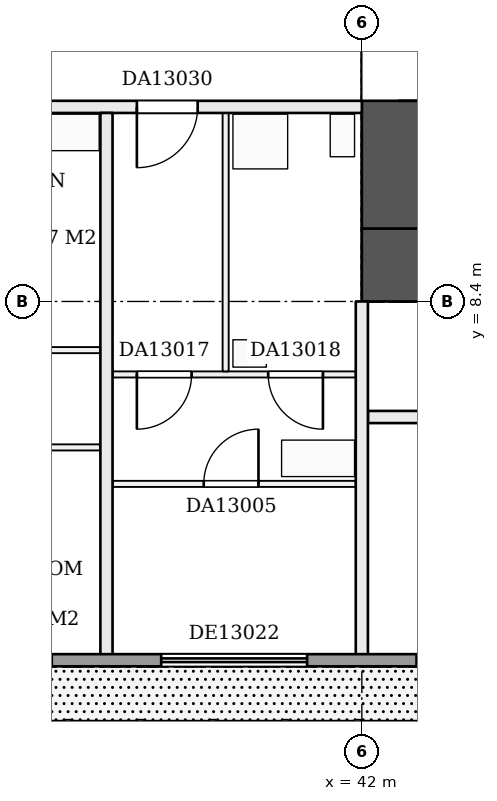
"""IFC4 building model, lengths in metres.
Left out: names, types, materials, properties, quantities, classifications, styles, units other than length and angle.
Written with IfcOpenShell. Run it as: python <this file> out.ifc"""

import sys

from ifc_helpers import new_model, si_unit, direction, frame, frame_2d, origin, place, context, subcontext, project, spatial, rectangle, extrude, element, fill, save


model = new_model("IFC4")
c1 = context("Model", 3, precision=1e-05, world=origin(), true_north=direction((0.0, 1.0)))
c2 = subcontext(c1, "Body", "Model", "MODEL_VIEW")
j1 = project(units=[si_unit("LENGTHUNIT", "METRE"), si_unit("PLANEANGLEUNIT", "RADIAN")], contexts=[c1])
p1 = place(None, origin())
s1 = spatial("IfcSite", under=j1, at=p1, CompositionType="ELEMENT")
p2 = place(p1, origin())
s2 = spatial("IfcBuilding", under=s1, at=p2, CompositionType="ELEMENT")
p3 = place(p2, frame((0.0, 0.0, 56.7)))
s3 = spatial("IfcBuildingStorey", under=s2, at=p3, CompositionType="ELEMENT", Elevation=56.7)
p4 = place(p3, frame((42.0, 9.0, 0.0), z_axis=(0.0, 0.0, 1.0), x_axis=(1.0, 0.0, 0.0)))
e1 = element("IfcWall", 1, at=p4, inside=s3, PredefinedType="SHEAR", context=c2, shape_type="SweptSolid", body=[
    extrude(rectangle(XDim=16.8, YDim=1.2, at=frame_2d((8.4, 0.0))), origin(), (0.0, 0.0, 1.0), 3.22),
])
p5 = place(p4, frame((3.1, 0.0, 0.0)))
e2 = element("IfcOpeningElement", 2, at=p5, cuts=e1, PredefinedType="OPENING", context=c2, shape_type="SweptSolid", body=[
    extrude(rectangle(XDim=1.0, YDim=2.1, at=frame_2d((0.5, 1.05))), frame((0.0, 0.61, 0.0), z_axis=(0.0, -1.0, 0.0), x_axis=(1.0, 0.0, 0.0)), (0.0, 0.0, 1.0), 1.22),
])
p6 = place(p4, frame((12.7, 0.0, 0.0)))
e3 = element("IfcOpeningElement", 3, at=p6, cuts=e1, PredefinedType="OPENING", context=c2, shape_type="SweptSolid", body=[
    extrude(rectangle(XDim=1.0, YDim=2.1, at=frame_2d((0.5, 1.05))), frame((0.0, 0.61, 0.0), z_axis=(0.0, -1.0, 0.0), x_axis=(1.0, 0.0, 0.0)), (0.0, 0.0, 1.0), 1.22),
])
p7 = place(p3, frame((42.6, 9.6, 0.0), z_axis=(0.0, 0.0, 1.0), x_axis=(0.0, 1.0, 0.0)))
e4 = element("IfcWall", 4, at=p7, inside=s3, PredefinedType="SHEAR", context=c2, shape_type="SweptSolid", body=[
    extrude(rectangle(XDim=14.4, YDim=1.2, at=frame_2d((7.2, 0.0))), origin(), (0.0, 0.0, 1.0), 3.22),
])
p8 = place(p7, frame((2.1, 0.0, 0.0)))
e5 = element("IfcOpeningElement", 5, at=p8, cuts=e4, PredefinedType="OPENING", context=c2, shape_type="SweptSolid", body=[
    extrude(rectangle(XDim=1.8, YDim=2.1, at=frame_2d((0.9, 1.05))), frame((0.0, 0.61, 0.0), z_axis=(0.0, -1.0, 0.0), x_axis=(1.0, 0.0, 0.0)), (0.0, 0.0, 1.0), 1.22),
])
p9 = place(p3, frame((37.9, 5.4, 0.0), z_axis=(0.0, 0.0, 1.0), x_axis=(1.0, 0.0, 0.0)))
e6 = element("IfcWall", 6, at=p9, inside=s3, PredefinedType="PARTITIONING", context=c2, shape_type="SweptSolid", body=[
    extrude(rectangle(XDim=4.0, YDim=0.1, at=frame_2d((2.0, 0.0))), origin(), (0.0, 0.0, 1.0), 3.22),
])
p10 = place(p9, frame((1.5, 0.0, 0.0)))
e7 = element("IfcOpeningElement", 7, at=p10, cuts=e6, PredefinedType="OPENING", context=c2, shape_type="SweptSolid", body=[
    extrude(rectangle(XDim=0.9, YDim=2.1, at=frame_2d((0.45, 1.05))), frame((0.0, 0.06, 0.0), z_axis=(0.0, -1.0, 0.0), x_axis=(1.0, 0.0, 0.0)), (0.0, 0.0, 1.0), 0.12),
])
p11 = place(p3, frame((8.45, 6.0, 0.0), z_axis=(0.0, 0.0, 1.0), x_axis=(1.0, 0.0, 0.0)))
e8 = element("IfcWall", 8, at=p11, inside=s3, PredefinedType="PARTITIONING", context=c2, shape_type="SweptSolid", body=[
    extrude(rectangle(XDim=29.25, YDim=0.1, at=frame_2d((14.625, 0.0))), origin(), (0.0, 0.0, 1.0), 3.22),
])
p12 = place(p11, frame((3.75, 0.0, 0.0)))
e9 = element("IfcOpeningElement", 9, at=p12, cuts=e8, PredefinedType="OPENING", context=c2, shape_type="SweptSolid", body=[
    extrude(rectangle(XDim=0.9, YDim=2.1, at=frame_2d((0.45, 1.05))), frame((0.0, 0.06, 0.0), z_axis=(0.0, -1.0, 0.0), x_axis=(1.0, 0.0, 0.0)), (0.0, 0.0, 1.0), 0.12),
])
p13 = place(p11, frame((9.95, 0.0, 0.0)))
e10 = element("IfcOpeningElement", 10, at=p13, cuts=e8, PredefinedType="OPENING", context=c2, shape_type="SweptSolid", body=[
    extrude(rectangle(XDim=0.9, YDim=2.1, at=frame_2d((0.45, 1.05))), frame((0.0, 0.06, 0.0), z_axis=(0.0, -1.0, 0.0), x_axis=(1.0, 0.0, 0.0)), (0.0, 0.0, 1.0), 0.12),
])
p14 = place(p11, frame((14.25, 0.0, 0.0)))
e11 = element("IfcOpeningElement", 11, at=p14, cuts=e8, PredefinedType="OPENING", context=c2, shape_type="SweptSolid", body=[
    extrude(rectangle(XDim=0.9, YDim=2.1, at=frame_2d((0.45, 1.05))), frame((0.0, 0.06, 0.0), z_axis=(0.0, -1.0, 0.0), x_axis=(1.0, 0.0, 0.0)), (0.0, 0.0, 1.0), 0.12),
])
p15 = place(p11, frame((20.45, 0.0, 0.0)))
e12 = element("IfcOpeningElement", 12, at=p15, cuts=e8, PredefinedType="OPENING", context=c2, shape_type="SweptSolid", body=[
    extrude(rectangle(XDim=0.9, YDim=2.1, at=frame_2d((0.45, 1.05))), frame((0.0, 0.06, 0.0), z_axis=(0.0, -1.0, 0.0), x_axis=(1.0, 0.0, 0.0)), (0.0, 0.0, 1.0), 0.12),
])
p16 = place(p11, frame((26.75, 0.0, 0.0)))
e13 = element("IfcOpeningElement", 13, at=p16, cuts=e8, PredefinedType="OPENING", context=c2, shape_type="SweptSolid", body=[
    extrude(rectangle(XDim=0.9, YDim=2.1, at=frame_2d((0.45, 1.05))), frame((0.0, 0.06, 0.0), z_axis=(0.0, -1.0, 0.0), x_axis=(1.0, 0.0, 0.0)), (0.0, 0.0, 1.0), 0.12),
])
p17 = place(p3, frame((42.1, 6.5, 0.0), z_axis=(0.0, 0.0, 1.0), x_axis=(1.0, 0.0, 0.0)))
e14 = element("IfcWall", 14, at=p17, inside=s3, PredefinedType="PARTITIONING", context=c2, shape_type="SweptSolid", body=[
    extrude(rectangle(XDim=18.7, YDim=0.2, at=frame_2d((9.35, 0.0))), origin(), (0.0, 0.0, 1.0), 3.22),
])
p18 = place(p17, frame((4.6, 0.0, 0.0)))
e15 = element("IfcOpeningElement", 15, at=p18, cuts=e14, PredefinedType="OPENING", context=c2, shape_type="SweptSolid", body=[
    extrude(rectangle(XDim=1.0, YDim=2.1, at=frame_2d((0.5, 1.05))), frame((0.0, 0.11, 0.0), z_axis=(0.0, -1.0, 0.0), x_axis=(1.0, 0.0, 0.0)), (0.0, 0.0, 1.0), 0.22),
])
p19 = place(p17, frame((13.1, 0.0, 0.0)))
e16 = element("IfcOpeningElement", 16, at=p19, cuts=e14, PredefinedType="OPENING", context=c2, shape_type="SweptSolid", body=[
    extrude(rectangle(XDim=1.0, YDim=2.1, at=frame_2d((0.5, 1.05))), frame((0.0, 0.11, 0.0), z_axis=(0.0, -1.0, 0.0), x_axis=(1.0, 0.0, 0.0)), (0.0, 0.0, 1.0), 0.22),
])
p20 = place(p17, frame((17.1, 0.0, 0.0)))
e17 = element("IfcOpeningElement", 17, at=p20, cuts=e14, PredefinedType="OPENING", context=c2, shape_type="SweptSolid", body=[
    extrude(rectangle(XDim=1.0, YDim=2.1, at=frame_2d((0.5, 1.05))), frame((0.0, 0.11, 0.0), z_axis=(0.0, -1.0, 0.0), x_axis=(1.0, 0.0, 0.0)), (0.0, 0.0, 1.0), 0.22),
])
p21 = place(p3, frame((37.9, 7.2, 0.0), z_axis=(0.0, 0.0, 1.0), x_axis=(1.0, 0.0, 0.0)))
e18 = element("IfcWall", 18, at=p21, inside=s3, PredefinedType="PARTITIONING", context=c2, shape_type="SweptSolid", body=[
    extrude(rectangle(XDim=4.0, YDim=0.1, at=frame_2d((2.0, 0.0))), origin(), (0.0, 0.0, 1.0), 3.22),
])
p22 = place(p21, frame((0.4, 0.0, 0.0)))
e19 = element("IfcOpeningElement", 19, at=p22, cuts=e18, PredefinedType="OPENING", context=c2, shape_type="SweptSolid", body=[
    extrude(rectangle(XDim=0.9, YDim=2.1, at=frame_2d((0.45, 1.05))), frame((0.0, 0.06, 0.0), z_axis=(0.0, -1.0, 0.0), x_axis=(1.0, 0.0, 0.0)), (0.0, 0.0, 1.0), 0.12),
])
p23 = place(p21, frame((2.56, 0.0, 0.0)))
e20 = element("IfcOpeningElement", 20, at=p23, cuts=e18, PredefinedType="OPENING", context=c2, shape_type="SweptSolid", body=[
    extrude(rectangle(XDim=0.9, YDim=2.1, at=frame_2d((0.45, 1.05))), frame((0.0, 0.06, 0.0), z_axis=(0.0, -1.0, 0.0), x_axis=(1.0, 0.0, 0.0)), (0.0, 0.0, 1.0), 0.12),
])
p24 = place(p3, frame((25.3, 7.6, 0.0), z_axis=(0.0, 0.0, 1.0), x_axis=(1.0, 0.0, 0.0)))
e21 = element("IfcWall", 21, at=p24, inside=s3, PredefinedType="PARTITIONING", context=c2, shape_type="SweptSolid", body=[
    extrude(rectangle(XDim=12.4, YDim=0.1, at=frame_2d((6.2, 0.0))), origin(), (0.0, 0.0, 1.0), 3.22),
])
p25 = place(p24, frame((3.6, 0.0, 0.0)))
e22 = element("IfcOpeningElement", 22, at=p25, cuts=e21, PredefinedType="OPENING", context=c2, shape_type="SweptSolid", body=[
    extrude(rectangle(XDim=0.9, YDim=2.1, at=frame_2d((0.45, 1.05))), frame((0.0, 0.06, 0.0), z_axis=(0.0, -1.0, 0.0), x_axis=(1.0, 0.0, 0.0)), (0.0, 0.0, 1.0), 0.12),
])
p26 = place(p24, frame((0.8, 0.0, 0.0)))
e23 = element("IfcOpeningElement", 23, at=p26, cuts=e21, PredefinedType="OPENING", context=c2, shape_type="SweptSolid", body=[
    extrude(rectangle(XDim=0.9, YDim=2.1, at=frame_2d((0.45, 1.05))), frame((0.0, 0.06, 0.0), z_axis=(0.0, -1.0, 0.0), x_axis=(1.0, 0.0, 0.0)), (0.0, 0.0, 1.0), 0.12),
])
p27 = place(p24, frame((6.5, 0.0, 0.0)))
e24 = element("IfcOpeningElement", 24, at=p27, cuts=e21, PredefinedType="OPENING", context=c2, shape_type="SweptSolid", body=[
    extrude(rectangle(XDim=0.9, YDim=2.1, at=frame_2d((0.45, 1.05))), frame((0.0, 0.06, 0.0), z_axis=(0.0, -1.0, 0.0), x_axis=(1.0, 0.0, 0.0)), (0.0, 0.0, 1.0), 0.12),
])
p28 = place(p24, frame((10.1, 0.0, 0.0)))
e25 = element("IfcOpeningElement", 25, at=p28, cuts=e21, PredefinedType="OPENING", context=c2, shape_type="SweptSolid", body=[
    extrude(rectangle(XDim=0.9, YDim=2.1, at=frame_2d((0.45, 1.05))), frame((0.0, 0.06, 0.0), z_axis=(0.0, -1.0, 0.0), x_axis=(1.0, 0.0, 0.0)), (0.0, 0.0, 1.0), 0.12),
])
p29 = place(p3, frame((11.5, 11.6, 0.0), z_axis=(0.0, 0.0, 1.0), x_axis=(1.0, 0.0, 0.0)))
e26 = element("IfcWall", 26, at=p29, inside=s3, PredefinedType="PARTITIONING", context=c2, shape_type="SweptSolid", body=[
    extrude(rectangle(XDim=30.5, YDim=0.2, at=frame_2d((15.25, 0.0))), origin(), (0.0, 0.0, 1.0), 3.22),
])
p30 = place(p29, frame((1.626, 0.0, 0.0)))
e27 = element("IfcOpeningElement", 27, at=p30, cuts=e26, PredefinedType="OPENING", context=c2, shape_type="SweptSolid", body=[
    extrude(rectangle(XDim=1.0, YDim=2.1, at=frame_2d((0.5, 1.05))), frame((0.0, 0.11, 0.0), z_axis=(0.0, -1.0, 0.0), x_axis=(1.0, 0.0, 0.0)), (0.0, 0.0, 1.0), 0.22),
])
p31 = place(p29, frame((11.933, 0.0, 0.0)))
e28 = element("IfcOpeningElement", 28, at=p31, cuts=e26, PredefinedType="OPENING", context=c2, shape_type="SweptSolid", body=[
    extrude(rectangle(XDim=1.0, YDim=2.1, at=frame_2d((0.5, 1.05))), frame((0.0, 0.11, 0.0), z_axis=(0.0, -1.0, 0.0), x_axis=(1.0, 0.0, 0.0)), (0.0, 0.0, 1.0), 0.22),
])
p32 = place(p29, frame((17.3, 0.0, 0.0)))
e29 = element("IfcOpeningElement", 29, at=p32, cuts=e26, PredefinedType="OPENING", context=c2, shape_type="SweptSolid", body=[
    extrude(rectangle(XDim=1.0, YDim=2.1, at=frame_2d((0.5, 1.05))), frame((0.0, 0.11, 0.0), z_axis=(0.0, -1.0, 0.0), x_axis=(1.0, 0.0, 0.0)), (0.0, 0.0, 1.0), 0.22),
])
p33 = place(p29, frame((26.8, 0.0, 0.0)))
e30 = element("IfcOpeningElement", 30, at=p33, cuts=e26, PredefinedType="OPENING", context=c2, shape_type="SweptSolid", body=[
    extrude(rectangle(XDim=1.0, YDim=2.1, at=frame_2d((0.5, 1.05))), frame((0.0, 0.11, 0.0), z_axis=(0.0, -1.0, 0.0), x_axis=(1.0, 0.0, 0.0)), (0.0, 0.0, 1.0), 0.22),
])
p34 = place(p3, frame((37.8, 2.5, 0.0), z_axis=(0.0, 0.0, 1.0), x_axis=(0.0, 1.0, 0.0)))
e31 = element("IfcWall", 31, at=p34, inside=s3, PredefinedType="PARTITIONING", context=c2, shape_type="SweptSolid", body=[
    extrude(rectangle(XDim=9.0, YDim=0.2, at=frame_2d((4.5, 0.0))), origin(), (0.0, 0.0, 1.0), 3.22),
])
p35 = place(p3, frame((39.76, 7.25, 0.0), z_axis=(0.0, 0.0, 1.0), x_axis=(0.0, 1.0, 0.0)))
e32 = element("IfcWall", 32, at=p35, inside=s3, PredefinedType="PARTITIONING", context=c2, shape_type="SweptSolid", body=[
    extrude(rectangle(XDim=4.25, YDim=0.1, at=frame_2d((2.125, 0.0))), origin(), (0.0, 0.0, 1.0), 3.22),
])
p36 = place(p3, frame((42.0, 2.5, 0.0), z_axis=(0.0, 0.0, 1.0), x_axis=(0.0, 1.0, 0.0)))
e33 = element("IfcWall", 33, at=p36, inside=s3, PredefinedType="PARTITIONING", context=c2, shape_type="SweptSolid", body=[
    extrude(rectangle(XDim=5.9, YDim=0.2, at=frame_2d((2.95, 0.0))), origin(), (0.0, 0.0, 1.0), 3.22),
])
p37 = place(p3, frame((4.8, 2.5, 0.0), z_axis=(0.0, 0.0, 1.0), x_axis=(1.0, 0.0, 0.0)))
e34 = element("IfcWall", 34, at=p37, inside=s3, PredefinedType="SOLIDWALL", context=c2, shape_type="SweptSolid", body=[
    extrude(rectangle(XDim=57.6, YDim=0.2, at=frame_2d((28.8, 0.0))), origin(), (0.0, 0.0, 1.0), 3.22),
])
p38 = place(p37, frame((0.3, 0.0, 0.0)))
e35 = element("IfcOpeningElement", 35, at=p38, cuts=e34, PredefinedType="OPENING", context=c2, shape_type="SweptSolid", body=[
    extrude(rectangle(XDim=2.4, YDim=2.2, at=frame_2d((1.2, 1.1))), frame((0.0, 0.11, 0.0), z_axis=(0.0, -1.0, 0.0), x_axis=(1.0, 0.0, 0.0)), (0.0, 0.0, 1.0), 0.22),
])
p39 = place(p37, frame((4.5, 0.0, 0.0)))
e36 = element("IfcOpeningElement", 36, at=p39, cuts=e34, PredefinedType="OPENING", context=c2, shape_type="SweptSolid", body=[
    extrude(rectangle(XDim=2.4, YDim=2.2, at=frame_2d((1.2, 1.1))), frame((0.0, 0.11, 0.0), z_axis=(0.0, -1.0, 0.0), x_axis=(1.0, 0.0, 0.0)), (0.0, 0.0, 1.0), 0.22),
])
p40 = place(p37, frame((8.7, 0.0, 0.0)))
e37 = element("IfcOpeningElement", 37, at=p40, cuts=e34, PredefinedType="OPENING", context=c2, shape_type="SweptSolid", body=[
    extrude(rectangle(XDim=2.4, YDim=2.2, at=frame_2d((1.2, 1.1))), frame((0.0, 0.11, 0.0), z_axis=(0.0, -1.0, 0.0), x_axis=(1.0, 0.0, 0.0)), (0.0, 0.0, 1.0), 0.22),
])
p41 = place(p37, frame((12.9, 0.0, 0.0)))
e38 = element("IfcOpeningElement", 38, at=p41, cuts=e34, PredefinedType="OPENING", context=c2, shape_type="SweptSolid", body=[
    extrude(rectangle(XDim=2.4, YDim=2.2, at=frame_2d((1.2, 1.1))), frame((0.0, 0.11, 0.0), z_axis=(0.0, -1.0, 0.0), x_axis=(1.0, 0.0, 0.0)), (0.0, 0.0, 1.0), 0.22),
])
p42 = place(p37, frame((17.1, 0.0, 0.9)))
e39 = element("IfcOpeningElement", 39, at=p42, cuts=e34, PredefinedType="OPENING", context=c2, shape_type="SweptSolid", body=[
    extrude(rectangle(XDim=2.4, YDim=1.5, at=frame_2d((1.2, 0.75))), frame((0.0, 0.11, 0.0), z_axis=(0.0, -1.0, 0.0), x_axis=(1.0, 0.0, 0.0)), (0.0, 0.0, 1.0), 0.22),
])
p43 = place(p37, frame((21.3, 0.0, 0.0)))
e40 = element("IfcOpeningElement", 40, at=p43, cuts=e34, PredefinedType="OPENING", context=c2, shape_type="SweptSolid", body=[
    extrude(rectangle(XDim=2.4, YDim=2.2, at=frame_2d((1.2, 1.1))), frame((0.0, 0.11, 0.0), z_axis=(0.0, -1.0, 0.0), x_axis=(1.0, 0.0, 0.0)), (0.0, 0.0, 1.0), 0.22),
])
p44 = place(p37, frame((25.5, 0.0, 0.0)))
e41 = element("IfcOpeningElement", 41, at=p44, cuts=e34, PredefinedType="OPENING", context=c2, shape_type="SweptSolid", body=[
    extrude(rectangle(XDim=2.4, YDim=2.2, at=frame_2d((1.2, 1.1))), frame((0.0, 0.11, 0.0), z_axis=(0.0, -1.0, 0.0), x_axis=(1.0, 0.0, 0.0)), (0.0, 0.0, 1.0), 0.22),
])
p45 = place(p37, frame((29.7, 0.0, 0.9)))
e42 = element("IfcOpeningElement", 42, at=p45, cuts=e34, PredefinedType="OPENING", context=c2, shape_type="SweptSolid", body=[
    extrude(rectangle(XDim=2.4, YDim=1.5, at=frame_2d((1.2, 0.75))), frame((0.0, 0.11, 0.0), z_axis=(0.0, -1.0, 0.0), x_axis=(1.0, 0.0, 0.0)), (0.0, 0.0, 1.0), 0.22),
])
p46 = place(p37, frame((33.9, 0.0, 0.0)))
e43 = element("IfcOpeningElement", 43, at=p46, cuts=e34, PredefinedType="OPENING", context=c2, shape_type="SweptSolid", body=[
    extrude(rectangle(XDim=2.4, YDim=2.2, at=frame_2d((1.2, 1.1))), frame((0.0, 0.11, 0.0), z_axis=(0.0, -1.0, 0.0), x_axis=(1.0, 0.0, 0.0)), (0.0, 0.0, 1.0), 0.22),
])
p47 = place(p37, frame((38.1, 0.0, 0.0)))
e44 = element("IfcOpeningElement", 44, at=p47, cuts=e34, PredefinedType="OPENING", context=c2, shape_type="SweptSolid", body=[
    extrude(rectangle(XDim=2.4, YDim=2.2, at=frame_2d((1.2, 1.1))), frame((0.0, 0.11, 0.0), z_axis=(0.0, -1.0, 0.0), x_axis=(1.0, 0.0, 0.0)), (0.0, 0.0, 1.0), 0.22),
])
p48 = place(p37, frame((42.3, 0.0, 0.9)))
e45 = element("IfcOpeningElement", 45, at=p48, cuts=e34, PredefinedType="OPENING", context=c2, shape_type="SweptSolid", body=[
    extrude(rectangle(XDim=2.4, YDim=1.5, at=frame_2d((1.2, 0.75))), frame((0.0, 0.11, 0.0), z_axis=(0.0, -1.0, 0.0), x_axis=(1.0, 0.0, 0.0)), (0.0, 0.0, 1.0), 0.22),
])
p49 = place(p37, frame((46.5, 0.0, 0.0)))
e46 = element("IfcOpeningElement", 46, at=p49, cuts=e34, PredefinedType="OPENING", context=c2, shape_type="SweptSolid", body=[
    extrude(rectangle(XDim=2.4, YDim=2.2, at=frame_2d((1.2, 1.1))), frame((0.0, 0.11, 0.0), z_axis=(0.0, -1.0, 0.0), x_axis=(1.0, 0.0, 0.0)), (0.0, 0.0, 1.0), 0.22),
])
p50 = place(p37, frame((50.7, 0.0, 0.9)))
e47 = element("IfcOpeningElement", 47, at=p50, cuts=e34, PredefinedType="OPENING", context=c2, shape_type="SweptSolid", body=[
    extrude(rectangle(XDim=2.4, YDim=1.5, at=frame_2d((1.2, 0.75))), frame((0.0, 0.11, 0.0), z_axis=(0.0, -1.0, 0.0), x_axis=(1.0, 0.0, 0.0)), (0.0, 0.0, 1.0), 0.22),
])
p51 = place(p37, frame((54.9, 0.0, 0.9)))
e48 = element("IfcOpeningElement", 48, at=p51, cuts=e34, PredefinedType="OPENING", context=c2, shape_type="SweptSolid", body=[
    extrude(rectangle(XDim=2.4, YDim=1.5, at=frame_2d((1.2, 0.75))), frame((0.0, 0.11, 0.0), z_axis=(0.0, -1.0, 0.0), x_axis=(1.0, 0.0, 0.0)), (0.0, 0.0, 1.0), 0.22),
])
p52 = place(p8, frame((1.8, 0.0, 0.0), z_axis=(0.0, 0.0, 1.0), x_axis=(-1.0, 0.0, 0.0)))
e49 = element("IfcDoor", 49, at=p52, inside=s3, OperationType="DOUBLE_DOOR_SINGLE_SWING", PredefinedType="DOOR", context=c2, shape_type="SweptSolid", body=[
    extrude(rectangle(XDim=1.8, YDim=2.1, at=frame_2d((0.9, 1.05))), frame((0.0, 0.025, 0.0), z_axis=(0.0, -1.0, 0.0), x_axis=(1.0, 0.0, 0.0)), (0.0, 0.0, 1.0), 0.05),
])
fill(e5, e49)
p53 = place(p10, origin())
e50 = element("IfcDoor", 50, at=p53, inside=s3, OperationType="SINGLE_SWING_RIGHT", PredefinedType="DOOR", context=c2, shape_type="SweptSolid", body=[
    extrude(rectangle(XDim=0.9, YDim=2.1, at=frame_2d((0.45, 1.05))), frame((0.0, 0.025, 0.0), z_axis=(0.0, -1.0, 0.0), x_axis=(1.0, 0.0, 0.0)), (0.0, 0.0, 1.0), 0.05),
])
fill(e7, e50)
p54 = place(p22, frame((0.9, 0.0, 0.0), z_axis=(0.0, 0.0, 1.0), x_axis=(-1.0, 0.0, 0.0)))
e51 = element("IfcDoor", 51, at=p54, inside=s3, OperationType="SINGLE_SWING_RIGHT", PredefinedType="DOOR", context=c2, shape_type="SweptSolid", body=[
    extrude(rectangle(XDim=0.9, YDim=2.1, at=frame_2d((0.45, 1.05))), frame((0.0, 0.025, 0.0), z_axis=(0.0, -1.0, 0.0), x_axis=(1.0, 0.0, 0.0)), (0.0, 0.0, 1.0), 0.05),
])
fill(e19, e51)
p55 = place(p23, frame((0.9, 0.0, 0.0), z_axis=(0.0, 0.0, 1.0), x_axis=(-1.0, 0.0, 0.0)))
e52 = element("IfcDoor", 52, at=p55, inside=s3, OperationType="SINGLE_SWING_LEFT", PredefinedType="DOOR", context=c2, shape_type="SweptSolid", body=[
    extrude(rectangle(XDim=0.9, YDim=2.1, at=frame_2d((0.45, 1.05))), frame((0.0, 0.025, 0.0), z_axis=(0.0, -1.0, 0.0), x_axis=(1.0, 0.0, 0.0)), (0.0, 0.0, 1.0), 0.05),
])
fill(e20, e52)
p56 = place(p33, frame((1.0, 0.0, 0.0), z_axis=(0.0, 0.0, 1.0), x_axis=(-1.0, 0.0, 0.0)))
e53 = element("IfcDoor", 53, at=p56, inside=s3, OperationType="SINGLE_SWING_RIGHT", PredefinedType="DOOR", context=c2, shape_type="SweptSolid", body=[
    extrude(rectangle(XDim=1.0, YDim=2.1, at=frame_2d((0.5, 1.05))), frame((0.0, 0.025, 0.0), z_axis=(0.0, -1.0, 0.0), x_axis=(1.0, 0.0, 0.0)), (0.0, 0.0, 1.0), 0.05),
])
fill(e30, e53)
p57 = place(p46, origin())
e54 = element("IfcDoor", 54, at=p57, inside=s3, OperationType="DOUBLE_DOOR_SLIDING", PredefinedType="DOOR", context=c2, shape_type="SweptSolid", body=[
    extrude(rectangle(XDim=2.4, YDim=2.2, at=frame_2d((1.2, 1.1))), frame((0.0, 0.025, 0.0), z_axis=(0.0, -1.0, 0.0), x_axis=(1.0, 0.0, 0.0)), (0.0, 0.0, 1.0), 0.05),
])
fill(e43, e54)
save(model, sys.argv[1])
